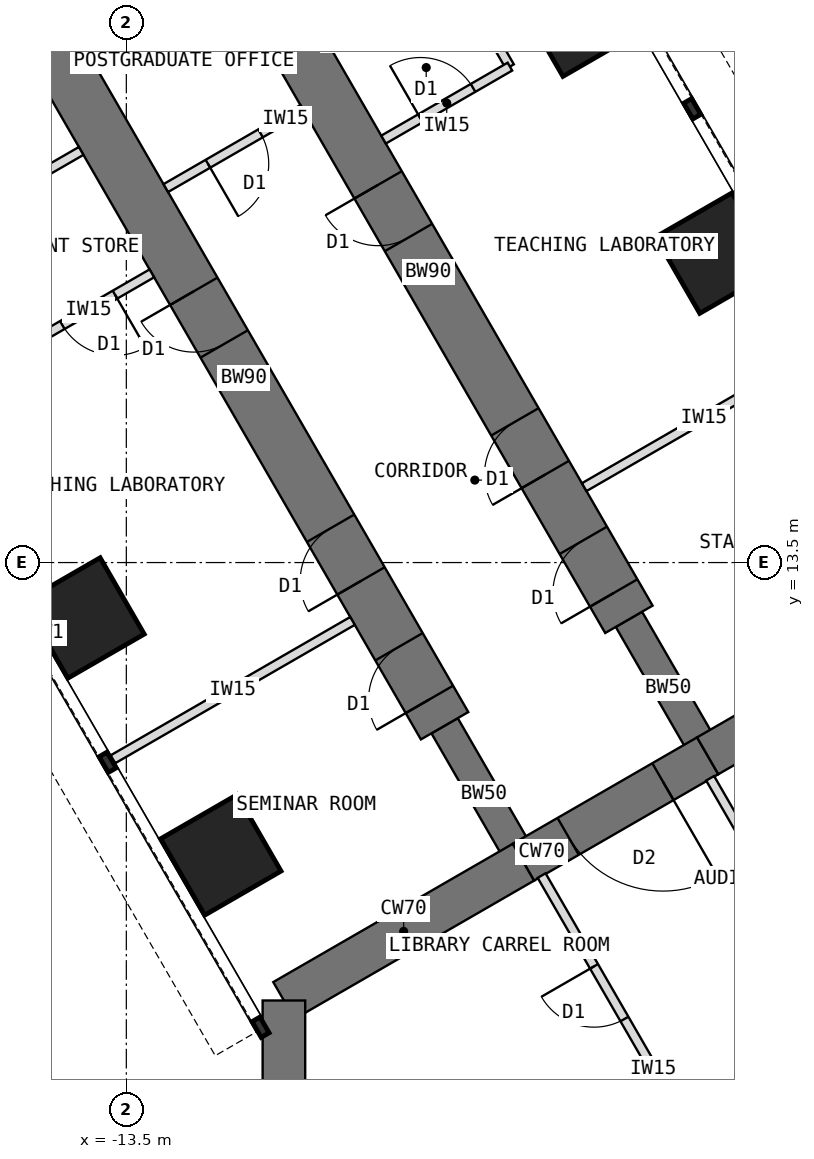
"""IFC4 building model, lengths in metres.
Left out: names, types, materials, properties, quantities, classifications, styles, units other than length and angle.
Written with IfcOpenShell. Run it as: python <this file> out.ifc"""

import sys

from ifc_helpers import new_model, si_unit, direction, frame, frame_2d, origin, origin_2d, place, context, subcontext, project, spatial, rectangle, extrude, element, fill, save


model = new_model("IFC4")
c1 = context("Model", 3, precision=1e-05, world=origin(), true_north=direction((0.0, 1.0)))
c2 = subcontext(c1, "Body", "Model", "MODEL_VIEW")
j1 = project(units=[si_unit("LENGTHUNIT", "METRE"), si_unit("PLANEANGLEUNIT", "RADIAN")], contexts=[c1])
p1 = place(None, origin())
s1 = spatial("IfcSite", under=j1, at=p1, CompositionType="ELEMENT")
p2 = place(p1, origin())
s2 = spatial("IfcBuilding", under=s1, at=p2, CompositionType="ELEMENT")
p3 = place(p2, frame((0.0, 0.0, 52.5)))
s3 = spatial("IfcBuildingStorey", under=s2, at=p3, CompositionType="ELEMENT", Elevation=52.5)
p4 = place(p3, frame((0.0, 12.596, 0.0), z_axis=(0.0, 0.0, 1.0), x_axis=(-0.866011268655, -0.500024481964, 0.0)))
e1 = element("IfcWall", 1, at=p4, inside=s3, PredefinedType="SHEAR", context=c2, shape_type="SweptSolid", body=[
    extrude(rectangle(XDim=4.548, YDim=0.7, at=frame_2d((2.274, 0.0))), origin(), (0.0, 0.0, 1.0), 4.0),
])
p5 = place(p3, frame((-3.939, 10.322, 0.0), z_axis=(0.0, 0.0, 1.0), x_axis=(-0.866019471182, -0.500010275428, 0.0)))
e2 = element("IfcWall", 2, at=p5, inside=s3, PredefinedType="SHEAR", context=c2, shape_type="SweptSolid", body=[
    extrude(rectangle(XDim=3.5, YDim=0.7, at=frame_2d((1.75, 0.0))), origin(), (0.0, 0.0, 1.0), 4.0),
])
p6 = place(p5, frame((0.85, 0.0, 0.0)))
e3 = element("IfcOpeningElement", 3, at=p6, cuts=e2, PredefinedType="OPENING", context=c2, shape_type="SweptSolid", body=[
    extrude(rectangle(XDim=1.8, YDim=2.1, at=frame_2d((0.9, 1.05))), frame((0.0, 0.36, 0.0), z_axis=(0.0, -1.0, 0.0), x_axis=(1.0, 0.0, 0.0)), (0.0, 0.0, 1.0), 0.72),
])
p7 = place(p3, frame((-6.97, 8.572, 0.0), z_axis=(0.0, 0.0, 1.0), x_axis=(-0.866034513004, -0.499984222037, 0.0)))
e4 = element("IfcWall", 4, at=p7, inside=s3, PredefinedType="SHEAR", context=c2, shape_type="SweptSolid", body=[
    extrude(rectangle(XDim=4.548, YDim=0.7, at=frame_2d((2.274, 0.0))), origin(), (0.0, 0.0, 1.0), 4.0),
])
p8 = place(p3, frame((-10.908, 6.298, 0.0), z_axis=(0.0, 0.0, 1.0), x_axis=(0.0, -1.0, 0.0)))
e5 = element("IfcWall", 5, at=p8, inside=s3, PredefinedType="SHEAR", context=c2, shape_type="SweptSolid", body=[
    extrude(rectangle(XDim=12.596, YDim=0.7, at=frame_2d((6.298, 0.0))), origin(), (0.0, 0.0, 1.0), 4.0),
])
p9 = place(p3, frame((-6.97, 8.572, 0.0), z_axis=(0.0, 0.0, 1.0), x_axis=(-0.499988811324, 0.866031863473, 0.0)))
e6 = element("IfcWall", 6, at=p9, inside=s3, PredefinedType="SHEAR", context=c2, shape_type="SweptSolid", body=[
    extrude(rectangle(XDim=2.592, YDim=0.5, at=frame_2d((1.296, 0.0))), origin(), (0.0, 0.0, 1.0), 4.0),
])
p10 = place(p3, frame((-8.266, 10.816, 0.0), z_axis=(0.0, 0.0, 1.0), x_axis=(-0.499996231654, 0.866027579429, 0.0)))
e7 = element("IfcWall", 7, at=p10, inside=s3, PredefinedType="SHEAR", context=c2, shape_type="SweptSolid", body=[
    extrude(rectangle(XDim=13.2, YDim=0.9, at=frame_2d((6.6, 0.0))), origin(), (0.0, 0.0, 1.0), 4.0),
])
p11 = place(p10, frame((0.5, 0.0, 0.0)))
e8 = element("IfcOpeningElement", 8, at=p11, cuts=e7, PredefinedType="OPENING", context=c2, shape_type="SweptSolid", body=[
    extrude(rectangle(XDim=1.0, YDim=2.1, at=frame_2d((0.5, 1.05))), frame((0.0, 0.46, 0.0), z_axis=(0.0, -1.0, 0.0), x_axis=(1.0, 0.0, 0.0)), (0.0, 0.0, 1.0), 0.92),
])
p12 = place(p10, frame((2.75, 0.0, 0.0)))
e9 = element("IfcOpeningElement", 9, at=p12, cuts=e7, PredefinedType="OPENING", context=c2, shape_type="SweptSolid", body=[
    extrude(rectangle(XDim=1.0, YDim=2.1, at=frame_2d((0.5, 1.05))), frame((0.0, 0.46, 0.0), z_axis=(0.0, -1.0, 0.0), x_axis=(1.0, 0.0, 0.0)), (0.0, 0.0, 1.0), 0.92),
])
p13 = place(p10, frame((7.25, 0.0, 0.0)))
e10 = element("IfcOpeningElement", 10, at=p13, cuts=e7, PredefinedType="OPENING", context=c2, shape_type="SweptSolid", body=[
    extrude(rectangle(XDim=1.0, YDim=2.1, at=frame_2d((0.5, 1.05))), frame((0.0, 0.46, 0.0), z_axis=(0.0, -1.0, 0.0), x_axis=(1.0, 0.0, 0.0)), (0.0, 0.0, 1.0), 0.92),
])
p14 = place(p3, frame((-3.939, 10.322, 0.0), z_axis=(0.0, 0.0, 1.0), x_axis=(-0.499918158782, 0.866072649678, 0.0)))
e11 = element("IfcWall", 11, at=p14, inside=s3, PredefinedType="SHEAR", context=c2, shape_type="SweptSolid", body=[
    extrude(rectangle(XDim=2.592, YDim=0.5, at=frame_2d((1.296, 0.0))), origin(), (0.0, 0.0, 1.0), 4.0),
])
p15 = place(p3, frame((-5.234, 12.566, 0.0), z_axis=(0.0, 0.0, 1.0), x_axis=(-0.500010103361, 0.866019570528, 0.0)))
e12 = element("IfcWall", 12, at=p15, inside=s3, PredefinedType="SHEAR", context=c2, shape_type="SweptSolid", body=[
    extrude(rectangle(XDim=13.2, YDim=0.9, at=frame_2d((6.6, 0.0))), origin(), (0.0, 0.0, 1.0), 4.0),
])
p16 = place(p15, frame((0.5, 0.0, 0.0)))
e13 = element("IfcOpeningElement", 13, at=p16, cuts=e12, PredefinedType="OPENING", context=c2, shape_type="SweptSolid", body=[
    extrude(rectangle(XDim=1.0, YDim=2.1, at=frame_2d((0.5, 1.05))), frame((0.0, 0.46, 0.0), z_axis=(0.0, -1.0, 0.0), x_axis=(1.0, 0.0, 0.0)), (0.0, 0.0, 1.0), 0.92),
])
p17 = place(p15, frame((2.75, 0.0, 0.0)))
e14 = element("IfcOpeningElement", 14, at=p17, cuts=e12, PredefinedType="OPENING", context=c2, shape_type="SweptSolid", body=[
    extrude(rectangle(XDim=1.0, YDim=2.1, at=frame_2d((0.5, 1.05))), frame((0.0, 0.46, 0.0), z_axis=(0.0, -1.0, 0.0), x_axis=(1.0, 0.0, 0.0)), (0.0, 0.0, 1.0), 0.92),
])
p18 = place(p15, frame((7.25, 0.0, 0.0)))
e15 = element("IfcOpeningElement", 15, at=p18, cuts=e12, PredefinedType="OPENING", context=c2, shape_type="SweptSolid", body=[
    extrude(rectangle(XDim=1.0, YDim=2.1, at=frame_2d((0.5, 1.05))), frame((0.0, 0.46, 0.0), z_axis=(0.0, -1.0, 0.0), x_axis=(1.0, 0.0, 0.0)), (0.0, 0.0, 1.0), 0.92),
])
for number, where, z_axis, x_axis in (
    (16, (-11.946, 8.691, 0.0), (0.0, 0.0, 1.0), (0.866, 0.5, 0.0)),
    (17, (-14.196, 12.588, 0.0), (0.0, 0.0, 1.0), (0.866, 0.5, 0.0)),
    (18, (-3.804, 18.588, 0.0), (0.0, 0.0, 1.0), (0.866, 0.5, 0.0)),
    (19, (-6.054, 22.486, 0.0), (0.0, 0.0, 1.0), (0.866, 0.5, 0.0)),
):
    element("IfcColumn", number, at=place(p3, frame(where, z_axis=z_axis, x_axis=x_axis)), inside=s3, PredefinedType="COLUMN", context=c2, shape_type="SweptSolid", body=[
        extrude(rectangle(XDim=1.45, YDim=1.45, at=origin_2d()), origin(), (0.0, 0.0, 1.0), 4.0),
    ])
p19 = place(p3, frame((-9.78, 12.54, 0.0), z_axis=(0.0, 0.0, 1.0), x_axis=(-0.866035472144, -0.499982560684, 0.0)))
e20 = element("IfcWall", 20, at=p19, inside=s3, PredefinedType="PARTITIONING", context=c2, shape_type="SweptSolid", body=[
    extrude(rectangle(XDim=4.55, YDim=0.15, at=frame_2d((2.275, 0.0))), origin(), (0.0, 0.0, 1.0), 3.8),
])
p20 = place(p3, frame((-13.08, 18.256, 0.0), z_axis=(0.0, 0.0, 1.0), x_axis=(-0.866024647952, -0.500001309137, 0.0)))
e21 = element("IfcWall", 21, at=p20, inside=s3, PredefinedType="PARTITIONING", context=c2, shape_type="SweptSolid", body=[
    extrude(rectangle(XDim=2.4, YDim=0.15, at=frame_2d((1.2, 0.0))), origin(), (0.0, 0.0, 1.0), 3.8),
])
p21 = place(p20, frame((0.7, 0.0, 0.0)))
e22 = element("IfcOpeningElement", 22, at=p21, cuts=e21, PredefinedType="OPENING", context=c2, shape_type="SweptSolid", body=[
    extrude(rectangle(XDim=1.0, YDim=2.1, at=frame_2d((0.5, 1.05))), frame((0.0, 0.085, 0.0), z_axis=(0.0, -1.0, 0.0), x_axis=(1.0, 0.0, 0.0)), (0.0, 0.0, 1.0), 0.17),
])
p22 = place(p3, frame((-14.243, 20.269, 0.0), z_axis=(0.0, 0.0, 1.0), x_axis=(-0.866006032174, -0.500033551112, 0.0)))
e23 = element("IfcWall", 23, at=p22, inside=s3, PredefinedType="PARTITIONING", context=c2, shape_type="SweptSolid", body=[
    extrude(rectangle(XDim=2.4, YDim=0.15, at=frame_2d((1.2, 0.0))), origin(), (0.0, 0.0, 1.0), 3.8),
])
p23 = place(p3, frame((-5.97, 14.74, 0.0), z_axis=(0.0, 0.0, 1.0), x_axis=(0.866035472144, 0.499982560684, 0.0)))
e24 = element("IfcWall", 24, at=p23, inside=s3, PredefinedType="PARTITIONING", context=c2, shape_type="SweptSolid", body=[
    extrude(rectangle(XDim=4.55, YDim=0.15, at=frame_2d((2.275, 0.0))), origin(), (0.0, 0.0, 1.0), 3.8),
])
p24 = place(p3, frame((-7.191, 21.656, 0.0), z_axis=(0.0, 0.0, 1.0), x_axis=(-0.500077600433, 0.865980596518, 0.0)))
e25 = element("IfcWall", 25, at=p24, inside=s3, PredefinedType="PARTITIONING", context=c2, shape_type="SweptSolid", body=[
    extrude(rectangle(XDim=2.4, YDim=0.15, at=frame_2d((1.2, 0.0))), origin(), (0.0, 0.0, 1.0), 3.8),
])
p25 = place(p3, frame((-9.27, 20.456, 0.0), z_axis=(0.0, 0.0, 1.0), x_axis=(0.866006032174, 0.500033551112, 0.0)))
e26 = element("IfcWall", 26, at=p25, inside=s3, PredefinedType="PARTITIONING", context=c2, shape_type="SweptSolid", body=[
    extrude(rectangle(XDim=2.4, YDim=0.15, at=frame_2d((1.2, 0.0))), origin(), (0.0, 0.0, 1.0), 3.8),
])
p26 = place(p25, frame((0.7, 0.0, 0.0)))
e27 = element("IfcOpeningElement", 27, at=p26, cuts=e26, PredefinedType="OPENING", context=c2, shape_type="SweptSolid", body=[
    extrude(rectangle(XDim=1.0, YDim=2.1, at=frame_2d((0.5, 1.05))), frame((0.0, 0.085, 0.0), z_axis=(0.0, -1.0, 0.0), x_axis=(1.0, 0.0, 0.0)), (0.0, 0.0, 1.0), 0.17),
])
p27 = place(p3, frame((-4.436, 4.483, 0.0), z_axis=(0.0, 0.0, 1.0), x_axis=(-0.500017246033, 0.866015446554, 0.0)))
e28 = element("IfcWall", 28, at=p27, inside=s3, PredefinedType="PARTITIONING", context=c2, shape_type="SweptSolid", body=[
    extrude(rectangle(XDim=4.469, YDim=0.15, at=frame_2d((2.234, 0.0))), origin(), (0.0, 0.0, 1.0), 3.8),
])
p28 = place(p27, frame((1.744, 0.0, 0.0)))
e29 = element("IfcOpeningElement", 29, at=p28, cuts=e28, PredefinedType="OPENING", context=c2, shape_type="SweptSolid", body=[
    extrude(rectangle(XDim=1.0, YDim=2.1, at=frame_2d((0.5, 1.05))), frame((0.0, 0.085, 0.0), z_axis=(0.0, -1.0, 0.0), x_axis=(1.0, 0.0, 0.0)), (0.0, 0.0, 1.0), 0.17),
])
p29 = place(p3, frame((-3.898, 9.952, 0.0), z_axis=(0.0, 0.0, 1.0), x_axis=(0.499999927604, -0.866025445582, 0.0)))
e30 = element("IfcWall", 30, at=p29, inside=s3, PredefinedType="PARTITIONING", context=c2, shape_type="SweptSolid", body=[
    extrude(rectangle(XDim=4.468, YDim=0.15, at=frame_2d((2.234, 0.0))), origin(), (0.0, 0.0, 1.0), 3.8),
])
p30 = place(p29, frame((1.724, 0.0, 0.0)))
e31 = element("IfcOpeningElement", 31, at=p30, cuts=e30, PredefinedType="OPENING", context=c2, shape_type="SweptSolid", body=[
    extrude(rectangle(XDim=1.0, YDim=2.1, at=frame_2d((0.5, 1.05))), frame((0.0, 0.085, 0.0), z_axis=(0.0, -1.0, 0.0), x_axis=(1.0, 0.0, 0.0)), (0.0, 0.0, 1.0), 0.17),
])
p31 = place(p3, frame((-10.599, 20.958, 0.0), z_axis=(0.0, 0.0, 1.0), x_axis=(-0.866021400173, -0.500006934395, 0.0)))
e32 = element("IfcWall", 32, at=p31, inside=s3, PredefinedType="PARTITIONING", context=c2, shape_type="SweptSolid", body=[
    extrude(rectangle(XDim=2.6, YDim=0.15, at=frame_2d((1.3, 0.0))), origin(), (0.0, 0.0, 1.0), 3.8),
])
p32 = place(p31, frame((0.8, 0.0, 0.0)))
e33 = element("IfcOpeningElement", 33, at=p32, cuts=e32, PredefinedType="OPENING", context=c2, shape_type="SweptSolid", body=[
    extrude(rectangle(XDim=1.0, YDim=2.1, at=frame_2d((0.5, 1.05))), frame((0.0, 0.085, 0.0), z_axis=(0.0, -1.0, 0.0), x_axis=(1.0, 0.0, 0.0)), (0.0, 0.0, 1.0), 0.17),
])
p33 = place(p6, origin())
e34 = element("IfcDoor", 34, at=p33, inside=s3, OperationType="DOUBLE_DOOR_DOUBLE_SWING", PredefinedType="DOOR", context=c2, shape_type="SweptSolid", body=[
    extrude(rectangle(XDim=1.72, YDim=2.06, at=frame_2d((0.9, 1.03))), frame((0.0, 0.025, 0.0), z_axis=(0.0, -1.0, 0.0), x_axis=(1.0, 0.0, 0.0)), (0.0, 0.0, 1.0), 0.05),
    extrude(rectangle(XDim=0.04, YDim=2.1, at=frame_2d((0.02, 1.05))), frame((0.0, 0.35, 0.0), z_axis=(0.0, -1.0, 0.0), x_axis=(1.0, 0.0, 0.0)), (0.0, 0.0, 1.0), 0.699),
    extrude(rectangle(XDim=0.04, YDim=2.1, at=frame_2d((1.78, 1.05))), frame((0.0, 0.35, 0.0), z_axis=(0.0, -1.0, 0.0), x_axis=(1.0, 0.0, 0.0)), (0.0, 0.0, 1.0), 0.699),
    extrude(rectangle(XDim=1.72, YDim=0.04, at=frame_2d((0.9, 2.08))), frame((0.0, 0.35, 0.0), z_axis=(0.0, -1.0, 0.0), x_axis=(1.0, 0.0, 0.0)), (0.0, 0.0, 1.0), 0.699),
])
fill(e3, e34)
p34 = place(p21, origin())
e35 = element("IfcDoor", 35, at=p34, inside=s3, OperationType="SINGLE_SWING_LEFT", PredefinedType="DOOR", context=c2, shape_type="SweptSolid", body=[
    extrude(rectangle(XDim=1.0, YDim=2.1, at=frame_2d((0.5, 1.05))), frame((0.0, 0.025, 0.0), z_axis=(0.0, -1.0, 0.0), x_axis=(1.0, 0.0, 0.0)), (0.0, 0.0, 1.0), 0.05),
])
fill(e22, e35)
p35 = place(p26, origin())
e36 = element("IfcDoor", 36, at=p35, inside=s3, OperationType="SINGLE_SWING_LEFT", PredefinedType="DOOR", context=c2, shape_type="SweptSolid", body=[
    extrude(rectangle(XDim=1.0, YDim=2.1, at=frame_2d((0.5, 1.05))), frame((0.0, 0.025, 0.0), z_axis=(0.0, -1.0, 0.0), x_axis=(1.0, 0.0, 0.0)), (0.0, 0.0, 1.0), 0.05),
])
fill(e27, e36)
p36 = place(p28, origin())
e37 = element("IfcDoor", 37, at=p36, inside=s3, OperationType="SINGLE_SWING_RIGHT", PredefinedType="DOOR", context=c2, shape_type="SweptSolid", body=[
    extrude(rectangle(XDim=1.0, YDim=2.1, at=frame_2d((0.5, 1.05))), frame((0.0, 0.025, 0.0), z_axis=(0.0, -1.0, 0.0), x_axis=(1.0, 0.0, 0.0)), (0.0, 0.0, 1.0), 0.05),
])
fill(e29, e37)
p37 = place(p32, origin())
e38 = element("IfcDoor", 38, at=p37, inside=s3, OperationType="SINGLE_SWING_RIGHT", PredefinedType="DOOR", context=c2, shape_type="SweptSolid", body=[
    extrude(rectangle(XDim=1.0, YDim=2.1, at=frame_2d((0.5, 1.05))), frame((0.0, 0.025, 0.0), z_axis=(0.0, -1.0, 0.0), x_axis=(1.0, 0.0, 0.0)), (0.0, 0.0, 1.0), 0.05),
])
fill(e33, e38)
p38 = place(p11, origin())
e39 = element("IfcDoor", 39, at=p38, inside=s3, OperationType="SINGLE_SWING_LEFT", PredefinedType="DOOR", context=c2, shape_type="SweptSolid", body=[
    extrude(rectangle(XDim=0.92, YDim=2.06, at=frame_2d((0.5, 1.03))), frame((0.0, 0.025, 0.0), z_axis=(0.0, -1.0, 0.0), x_axis=(1.0, 0.0, 0.0)), (0.0, 0.0, 1.0), 0.05),
    extrude(rectangle(XDim=0.04, YDim=2.1, at=frame_2d((0.02, 1.05))), frame((0.0, 0.45, 0.0), z_axis=(0.0, -1.0, 0.0), x_axis=(1.0, 0.0, 0.0)), (0.0, 0.0, 1.0), 0.899),
    extrude(rectangle(XDim=0.04, YDim=2.1, at=frame_2d((0.98, 1.05))), frame((0.0, 0.45, 0.0), z_axis=(0.0, -1.0, 0.0), x_axis=(1.0, 0.0, 0.0)), (0.0, 0.0, 1.0), 0.899),
    extrude(rectangle(XDim=0.92, YDim=0.04, at=frame_2d((0.5, 2.08))), frame((0.0, 0.45, 0.0), z_axis=(0.0, -1.0, 0.0), x_axis=(1.0, 0.0, 0.0)), (0.0, 0.0, 1.0), 0.899),
])
fill(e8, e39)
p39 = place(p12, origin())
e40 = element("IfcDoor", 40, at=p39, inside=s3, OperationType="SINGLE_SWING_LEFT", PredefinedType="DOOR", context=c2, shape_type="SweptSolid", body=[
    extrude(rectangle(XDim=0.92, YDim=2.06, at=frame_2d((0.5, 1.03))), frame((0.0, 0.025, 0.0), z_axis=(0.0, -1.0, 0.0), x_axis=(1.0, 0.0, 0.0)), (0.0, 0.0, 1.0), 0.05),
    extrude(rectangle(XDim=0.04, YDim=2.1, at=frame_2d((0.02, 1.05))), frame((0.0, 0.45, 0.0), z_axis=(0.0, -1.0, 0.0), x_axis=(1.0, 0.0, 0.0)), (0.0, 0.0, 1.0), 0.899),
    extrude(rectangle(XDim=0.04, YDim=2.1, at=frame_2d((0.98, 1.05))), frame((0.0, 0.45, 0.0), z_axis=(0.0, -1.0, 0.0), x_axis=(1.0, 0.0, 0.0)), (0.0, 0.0, 1.0), 0.899),
    extrude(rectangle(XDim=0.92, YDim=0.04, at=frame_2d((0.5, 2.08))), frame((0.0, 0.45, 0.0), z_axis=(0.0, -1.0, 0.0), x_axis=(1.0, 0.0, 0.0)), (0.0, 0.0, 1.0), 0.899),
])
fill(e9, e40)
p40 = place(p13, origin())
e41 = element("IfcDoor", 41, at=p40, inside=s3, OperationType="SINGLE_SWING_RIGHT", PredefinedType="DOOR", context=c2, shape_type="SweptSolid", body=[
    extrude(rectangle(XDim=0.92, YDim=2.06, at=frame_2d((0.5, 1.03))), frame((0.0, 0.025, 0.0), z_axis=(0.0, -1.0, 0.0), x_axis=(1.0, 0.0, 0.0)), (0.0, 0.0, 1.0), 0.05),
    extrude(rectangle(XDim=0.04, YDim=2.1, at=frame_2d((0.02, 1.05))), frame((0.0, 0.45, 0.0), z_axis=(0.0, -1.0, 0.0), x_axis=(1.0, 0.0, 0.0)), (0.0, 0.0, 1.0), 0.899),
    extrude(rectangle(XDim=0.04, YDim=2.1, at=frame_2d((0.98, 1.05))), frame((0.0, 0.45, 0.0), z_axis=(0.0, -1.0, 0.0), x_axis=(1.0, 0.0, 0.0)), (0.0, 0.0, 1.0), 0.899),
    extrude(rectangle(XDim=0.92, YDim=0.04, at=frame_2d((0.5, 2.08))), frame((0.0, 0.45, 0.0), z_axis=(0.0, -1.0, 0.0), x_axis=(1.0, 0.0, 0.0)), (0.0, 0.0, 1.0), 0.899),
])
fill(e10, e41)
p41 = place(p16, origin())
e42 = element("IfcDoor", 42, at=p41, inside=s3, OperationType="SINGLE_SWING_LEFT", PredefinedType="DOOR", context=c2, shape_type="SweptSolid", body=[
    extrude(rectangle(XDim=0.92, YDim=2.06, at=frame_2d((0.5, 1.03))), frame((0.0, 0.025, 0.0), z_axis=(0.0, -1.0, 0.0), x_axis=(1.0, 0.0, 0.0)), (0.0, 0.0, 1.0), 0.05),
    extrude(rectangle(XDim=0.04, YDim=2.1, at=frame_2d((0.02, 1.05))), frame((0.0, 0.45, 0.0), z_axis=(0.0, -1.0, 0.0), x_axis=(1.0, 0.0, 0.0)), (0.0, 0.0, 1.0), 0.899),
    extrude(rectangle(XDim=0.04, YDim=2.1, at=frame_2d((0.98, 1.05))), frame((0.0, 0.45, 0.0), z_axis=(0.0, -1.0, 0.0), x_axis=(1.0, 0.0, 0.0)), (0.0, 0.0, 1.0), 0.899),
    extrude(rectangle(XDim=0.92, YDim=0.04, at=frame_2d((0.5, 2.08))), frame((0.0, 0.45, 0.0), z_axis=(0.0, -1.0, 0.0), x_axis=(1.0, 0.0, 0.0)), (0.0, 0.0, 1.0), 0.899),
])
fill(e13, e42)
p42 = place(p17, origin())
e43 = element("IfcDoor", 43, at=p42, inside=s3, OperationType="SINGLE_SWING_LEFT", PredefinedType="DOOR", context=c2, shape_type="SweptSolid", body=[
    extrude(rectangle(XDim=0.92, YDim=2.06, at=frame_2d((0.5, 1.03))), frame((0.0, 0.025, 0.0), z_axis=(0.0, -1.0, 0.0), x_axis=(1.0, 0.0, 0.0)), (0.0, 0.0, 1.0), 0.05),
    extrude(rectangle(XDim=0.04, YDim=2.1, at=frame_2d((0.02, 1.05))), frame((0.0, 0.45, 0.0), z_axis=(0.0, -1.0, 0.0), x_axis=(1.0, 0.0, 0.0)), (0.0, 0.0, 1.0), 0.899),
    extrude(rectangle(XDim=0.04, YDim=2.1, at=frame_2d((0.98, 1.05))), frame((0.0, 0.45, 0.0), z_axis=(0.0, -1.0, 0.0), x_axis=(1.0, 0.0, 0.0)), (0.0, 0.0, 1.0), 0.899),
    extrude(rectangle(XDim=0.92, YDim=0.04, at=frame_2d((0.5, 2.08))), frame((0.0, 0.45, 0.0), z_axis=(0.0, -1.0, 0.0), x_axis=(1.0, 0.0, 0.0)), (0.0, 0.0, 1.0), 0.899),
])
fill(e14, e43)
p43 = place(p18, origin())
e44 = element("IfcDoor", 44, at=p43, inside=s3, OperationType="SINGLE_SWING_RIGHT", PredefinedType="DOOR", context=c2, shape_type="SweptSolid", body=[
    extrude(rectangle(XDim=0.92, YDim=2.06, at=frame_2d((0.5, 1.03))), frame((0.0, 0.025, 0.0), z_axis=(0.0, -1.0, 0.0), x_axis=(1.0, 0.0, 0.0)), (0.0, 0.0, 1.0), 0.05),
    extrude(rectangle(XDim=0.04, YDim=2.1, at=frame_2d((0.02, 1.05))), frame((0.0, 0.45, 0.0), z_axis=(0.0, -1.0, 0.0), x_axis=(1.0, 0.0, 0.0)), (0.0, 0.0, 1.0), 0.899),
    extrude(rectangle(XDim=0.04, YDim=2.1, at=frame_2d((0.98, 1.05))), frame((0.0, 0.45, 0.0), z_axis=(0.0, -1.0, 0.0), x_axis=(1.0, 0.0, 0.0)), (0.0, 0.0, 1.0), 0.899),
    extrude(rectangle(XDim=0.92, YDim=0.04, at=frame_2d((0.5, 2.08))), frame((0.0, 0.45, 0.0), z_axis=(0.0, -1.0, 0.0), x_axis=(1.0, 0.0, 0.0)), (0.0, 0.0, 1.0), 0.899),
])
fill(e15, e44)
save(model, sys.argv[1])
